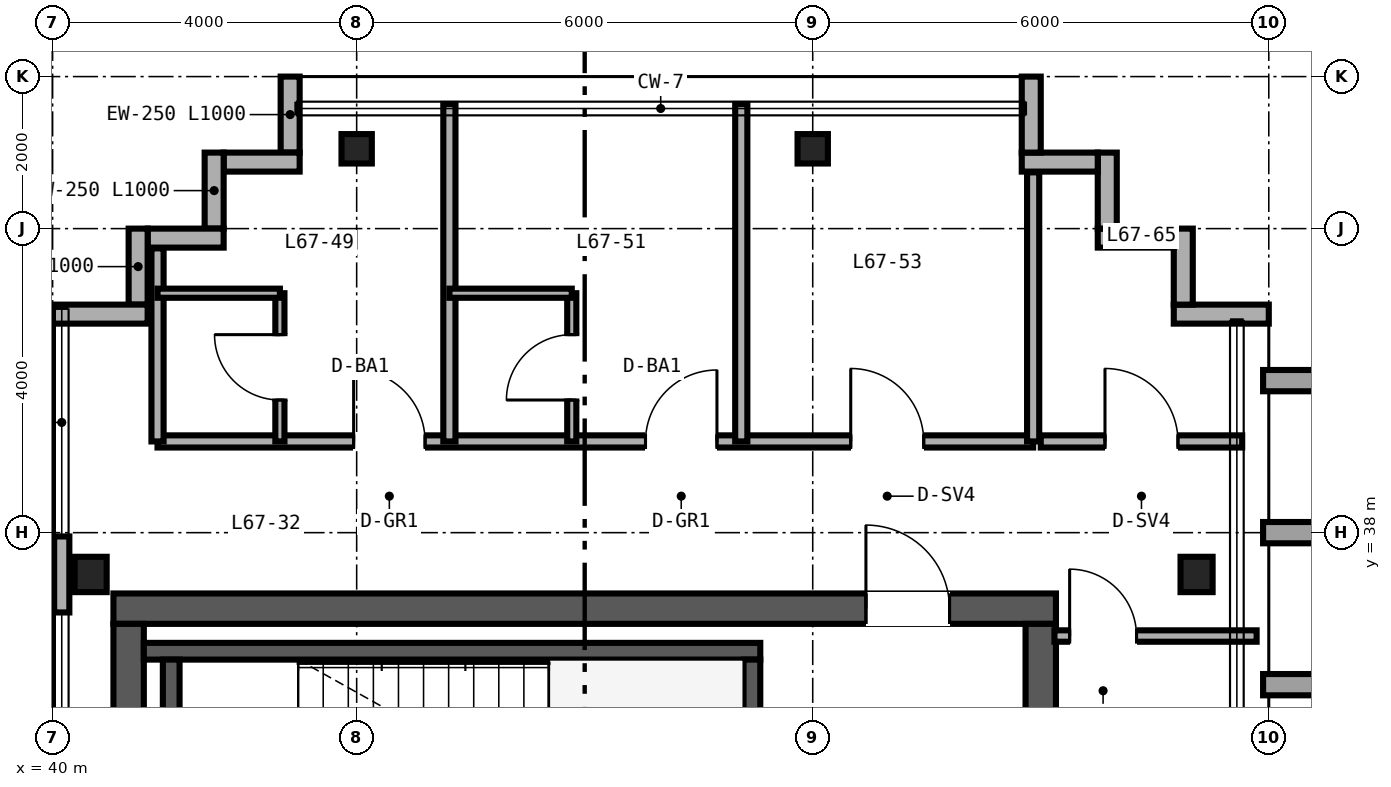
"""IFC4 building model, lengths in metres.
Left out: names, types, materials, properties, quantities, classifications, styles, units other than length and angle.
Written with IfcOpenShell. Run it as: python <this file> out.ifc"""

import sys

from ifc_helpers import new_model, si_unit, direction, frame, frame_2d, origin, origin_2d, place, context, subcontext, project, spatial, rectangle, i_section, extrude, source, transform, mapped, element, fill, save


model = new_model("IFC4")
c1 = context("Model", 3, precision=1e-05, world=origin(), true_north=direction((0.0, 1.0)))
c2 = subcontext(c1, "Body", "Model", "MODEL_VIEW")
j1 = project(units=[si_unit("LENGTHUNIT", "METRE"), si_unit("PLANEANGLEUNIT", "RADIAN")], contexts=[c1])
p1 = place(None, origin())
s1 = spatial("IfcSite", under=j1, at=p1, CompositionType="ELEMENT")
p2 = place(p1, origin())
s2 = spatial("IfcBuilding", under=s1, at=p2, CompositionType="ELEMENT")
p3 = place(p2, frame((0.0, 0.0, 265.2)))
s3 = spatial("IfcBuildingStorey", under=s2, at=p3, CompositionType="ELEMENT", Elevation=265.2)
p4 = place(p3, frame((40.8, 37.0, 0.0), z_axis=(0.0, 0.0, 1.0), x_axis=(1.0, 0.0, 0.0)))
e1 = element("IfcWall", 1, at=p4, inside=s3, PredefinedType="SHEAR", context=c2, shape_type="SweptSolid", body=[
    extrude(rectangle(XDim=12.4, YDim=0.4, at=frame_2d((6.2, 0.0))), origin(), (0.0, 0.0, 1.0), 3.38),
])
p5 = place(p4, frame((9.9, 0.0, 0.0)))
e2 = element("IfcOpeningElement", 2, at=p5, cuts=e1, PredefinedType="OPENING", context=c2, shape_type="SweptSolid", body=[
    extrude(rectangle(XDim=1.1, YDim=2.15, at=frame_2d((0.55, 1.075))), frame((0.0, 0.21, 0.0), z_axis=(0.0, -1.0, 0.0), x_axis=(1.0, 0.0, 0.0)), (0.0, 0.0, 1.0), 0.42),
])
for number, where, z_axis, x_axis in (
    (3, (41.0, 15.2, 0.0), (0.0, 0.0, 1.0), (0.0, 1.0, 0.0)),
    (4, (53.0, 15.2, 0.0), (0.0, 0.0, 1.0), (0.0, 1.0, 0.0)),
):
    element("IfcWall", number, at=place(p3, frame(where, z_axis=z_axis, x_axis=x_axis)), inside=s3, PredefinedType="SHEAR", context=c2, shape_type="SweptSolid", body=[
        extrude(rectangle(XDim=21.6, YDim=0.4, at=frame_2d((10.8, 0.0))), origin(), (0.0, 0.0, 1.0), 3.38),
    ])
p6 = place(p3, frame((41.2, 36.44, 0.0), z_axis=(0.0, 0.0, 1.0), x_axis=(1.0, 0.0, 0.0)))
e5 = element("IfcWall", 5, at=p6, inside=s3, PredefinedType="SHEAR", context=c2, shape_type="SweptSolid", body=[
    extrude(rectangle(XDim=8.11, YDim=0.22, at=frame_2d((4.055, 0.0))), origin(), (0.0, 0.0, 1.0), 3.4),
])
for number, where, z_axis, x_axis in (
    (6, (41.56, 33.05, 0.0), (0.0, 0.0, 1.0), (0.0, 1.0, 0.0)),
    (7, (49.2, 33.05, 0.0), (0.0, 0.0, 1.0), (0.0, 1.0, 0.0)),
):
    element("IfcWall", number, at=place(p3, frame(where, z_axis=z_axis, x_axis=x_axis)), inside=s3, PredefinedType="SHEAR", context=c2, shape_type="SweptSolid", body=[
        extrude(rectangle(XDim=3.28, YDim=0.22, at=frame_2d((1.64, 0.0))), origin(), (0.0, 0.0, 1.0), 3.4),
    ])
m1 = source(origin(), c2, "Body", "SweptSolid", [
    extrude(i_section(OverallWidth=0.422, OverallDepth=0.465, WebThickness=0.045, FlangeThickness=0.073, FilletRadius=0.025, at=origin_2d()), origin(), (0.0, 0.0, 1.0), 3.38),
])
for number, where, z_axis, x_axis in (
    (8, (40.5, 37.45, 0.0), (0.0, 0.0, 1.0), (1.0, 0.0, 0.0)),
    (9, (55.05, 37.45, 0.0), (0.0, 0.0, 1.0), (1.0, 0.0, 0.0)),
):
    element("IfcColumn", number, at=place(p3, frame(where, z_axis=z_axis, x_axis=x_axis)), inside=s3, PredefinedType="COLUMN", context=c2, shape_type="MappedRepresentation", body=[
        mapped(m1, transform((0.0, 0.0, 0.0), scale=1.0)),
    ])
m2 = source(origin(), c2, "Body", "SweptSolid", [
    extrude(i_section(OverallWidth=0.399, OverallDepth=0.387, WebThickness=0.021, FlangeThickness=0.033, FilletRadius=0.025, at=origin_2d()), origin(), (0.0, 0.0, 1.0), 3.38),
])
for number, where, z_axis, x_axis in (
    (10, (44.0, 43.05, 0.0), (0.0, 0.0, 1.0), (1.0, 0.0, 0.0)),
    (11, (50.0, 43.05, 0.0), (0.0, 0.0, 1.0), (1.0, 0.0, 0.0)),
):
    element("IfcColumn", number, at=place(p3, frame(where, z_axis=z_axis, x_axis=x_axis)), inside=s3, PredefinedType="COLUMN", context=c2, shape_type="MappedRepresentation", body=[
        mapped(m2, transform((0.0, 0.0, 0.0), scale=1.0)),
    ])
p7 = place(p3, frame((56.0, 40.875, 0.0), z_axis=(0.0, 0.0, 1.0), x_axis=(-1.0, 0.0, 0.0)))
e12 = element("IfcWall", 12, at=p7, inside=s3, PredefinedType="SOLIDWALL", context=c2, shape_type="SweptSolid", body=[
    extrude(rectangle(XDim=1.25, YDim=0.25, at=frame_2d((0.625, 0.0))), origin(), (0.0, 0.0, 1.0), 3.38),
])
for number, where, z_axis, x_axis in (
    (13, (54.875, 41.0, 0.0), (0.0, 0.0, 1.0), (0.0, 1.0, 0.0)),
    (14, (54.75, 41.875, 0.0), (0.0, 0.0, 1.0), (-1.0, 0.0, 0.0)),
    (15, (53.875, 42.0, 0.0), (0.0, 0.0, 1.0), (0.0, 1.0, 0.0)),
    (16, (53.75, 42.875, 0.0), (0.0, 0.0, 1.0), (-1.0, 0.0, 0.0)),
    (17, (52.875, 43.0, 0.0), (0.0, 0.0, 1.0), (0.0, 1.0, 0.0)),
    (18, (43.125, 44.0, 0.0), (0.0, 0.0, 1.0), (0.0, -1.0, 0.0)),
    (19, (43.25, 42.875, 0.0), (0.0, 0.0, 1.0), (-1.0, 0.0, 0.0)),
    (20, (42.125, 43.0, 0.0), (0.0, 0.0, 1.0), (0.0, -1.0, 0.0)),
    (21, (42.25, 41.875, 0.0), (0.0, 0.0, 1.0), (-1.0, 0.0, 0.0)),
    (22, (41.125, 42.0, 0.0), (0.0, 0.0, 1.0), (0.0, -1.0, 0.0)),
):
    element("IfcWall", number, at=place(p3, frame(where, z_axis=z_axis, x_axis=x_axis)), inside=s3, PredefinedType="SOLIDWALL", context=c2, shape_type="SweptSolid", body=[
        extrude(rectangle(XDim=1.0, YDim=0.25, at=frame_2d((0.5, 0.0))), origin(), (0.0, 0.0, 1.0), 3.38),
    ])
p8 = place(p3, frame((41.25, 40.875, 0.0), z_axis=(0.0, 0.0, 1.0), x_axis=(-1.0, 0.0, 0.0)))
e23 = element("IfcWall", 23, at=p8, inside=s3, PredefinedType="SOLIDWALL", context=c2, shape_type="SweptSolid", body=[
    extrude(rectangle(XDim=1.25, YDim=0.25, at=frame_2d((0.625, 0.0))), origin(), (0.0, 0.0, 1.0), 3.38),
])
p9 = place(p3, frame((40.12, 36.95, 0.0), z_axis=(0.0, 0.0, 1.0), x_axis=(0.0, 1.0, 0.0)))
e24 = element("IfcWall", 24, at=p9, inside=s3, PredefinedType="PARAPET", context=c2, shape_type="SweptSolid", body=[
    extrude(rectangle(XDim=1.0, YDim=0.2, at=frame_2d((0.5, 0.0))), origin(), (0.0, 0.0, 1.0), 3.38),
])
p10 = place(p3, frame((41.38, 39.2, 0.0), z_axis=(0.0, 0.0, 1.0), x_axis=(1.0, 0.0, 0.0)))
e25 = element("IfcWall", 25, at=p10, inside=s3, PredefinedType="PARTITIONING", context=c2, shape_type="SweptSolid", body=[
    extrude(rectangle(XDim=11.52, YDim=0.16, at=frame_2d((5.76, 0.0))), origin(), (0.0, 0.0, 1.0), 3.38),
])
p11 = place(p10, frame((2.58, 0.0, 0.0)))
e26 = element("IfcOpeningElement", 26, at=p11, cuts=e25, PredefinedType="OPENING", context=c2, shape_type="SweptSolid", body=[
    extrude(rectangle(XDim=0.94, YDim=2.15, at=frame_2d((0.47, 1.075))), frame((0.0, 0.09, 0.0), z_axis=(0.0, -1.0, 0.0), x_axis=(1.0, 0.0, 0.0)), (0.0, 0.0, 1.0), 0.18),
])
p12 = place(p10, frame((6.42, 0.0, 0.0)))
e27 = element("IfcOpeningElement", 27, at=p12, cuts=e25, PredefinedType="OPENING", context=c2, shape_type="SweptSolid", body=[
    extrude(rectangle(XDim=0.94, YDim=2.15, at=frame_2d((0.47, 1.075))), frame((0.0, 0.09, 0.0), z_axis=(0.0, -1.0, 0.0), x_axis=(1.0, 0.0, 0.0)), (0.0, 0.0, 1.0), 0.18),
])
p13 = place(p10, frame((9.12, 0.0, 0.0)))
e28 = element("IfcOpeningElement", 28, at=p13, cuts=e25, PredefinedType="OPENING", context=c2, shape_type="SweptSolid", body=[
    extrude(rectangle(XDim=0.96, YDim=2.15, at=frame_2d((0.48, 1.075))), frame((0.0, 0.09, 0.0), z_axis=(0.0, -1.0, 0.0), x_axis=(1.0, 0.0, 0.0)), (0.0, 0.0, 1.0), 0.18),
])
p14 = place(p3, frame((41.38, 39.2, 0.0), z_axis=(0.0, 0.0, 1.0), x_axis=(0.0, 1.0, 0.0)))
e29 = element("IfcWall", 29, at=p14, inside=s3, PredefinedType="PARTITIONING", context=c2, shape_type="SweptSolid", body=[
    extrude(rectangle(XDim=2.54, YDim=0.16, at=frame_2d((1.27, 0.0))), origin(), (0.0, 0.0, 1.0), 3.38),
])
p15 = place(p3, frame((52.9, 39.2, 0.0), z_axis=(0.0, 0.0, 1.0), x_axis=(0.0, 1.0, 0.0)))
e30 = element("IfcWall", 30, at=p15, inside=s3, PredefinedType="PARTITIONING", context=c2, shape_type="SweptSolid", body=[
    extrude(rectangle(XDim=3.54, YDim=0.16, at=frame_2d((1.77, 0.0))), origin(), (0.0, 0.0, 1.0), 3.38),
])
p16 = place(p3, frame((45.22, 39.2, 0.0), z_axis=(0.0, 0.0, 1.0), x_axis=(0.0, 1.0, 0.0)))
e31 = element("IfcWall", 31, at=p16, inside=s3, PredefinedType="PARTITIONING", context=c2, shape_type="SweptSolid", body=[
    extrude(rectangle(XDim=4.44, YDim=0.16, at=frame_2d((2.22, 0.0))), origin(), (0.0, 0.0, 1.0), 2.687),
])
p17 = place(p3, frame((42.99, 39.2, 0.0), z_axis=(0.0, 0.0, 1.0), x_axis=(0.0, 1.0, 0.0)))
e32 = element("IfcWall", 32, at=p17, inside=s3, PredefinedType="PARTITIONING", context=c2, shape_type="SweptSolid", body=[
    extrude(rectangle(XDim=1.95, YDim=0.12, at=frame_2d((0.975, 0.0))), origin(), (0.0, 0.0, 1.0), 3.38),
])
p18 = place(p17, frame((0.545, 0.0, 0.0)))
e33 = element("IfcOpeningElement", 33, at=p18, cuts=e32, PredefinedType="OPENING", context=c2, shape_type="SweptSolid", body=[
    extrude(rectangle(XDim=0.86, YDim=2.1, at=frame_2d((0.43, 1.05))), frame((0.0, 0.07, 0.0), z_axis=(0.0, -1.0, 0.0), x_axis=(1.0, 0.0, 0.0)), (0.0, 0.0, 1.0), 0.14),
])
p19 = place(p3, frame((41.38, 41.15, 0.0), z_axis=(0.0, 0.0, 1.0), x_axis=(1.0, 0.0, 0.0)))
e34 = element("IfcWall", 34, at=p19, inside=s3, PredefinedType="PARTITIONING", context=c2, shape_type="SweptSolid", body=[
    extrude(rectangle(XDim=1.61, YDim=0.12, at=frame_2d((0.805, 0.0))), origin(), (0.0, 0.0, 1.0), 3.38),
])
p20 = place(p3, frame((49.06, 39.2, 0.0), z_axis=(0.0, 0.0, 1.0), x_axis=(0.0, 1.0, 0.0)))
e35 = element("IfcWall", 35, at=p20, inside=s3, PredefinedType="PARTITIONING", context=c2, shape_type="SweptSolid", body=[
    extrude(rectangle(XDim=4.44, YDim=0.16, at=frame_2d((2.22, 0.0))), origin(), (0.0, 0.0, 1.0), 2.687),
])
p21 = place(p3, frame((46.83, 39.2, 0.0), z_axis=(0.0, 0.0, 1.0), x_axis=(0.0, 1.0, 0.0)))
e36 = element("IfcWall", 36, at=p21, inside=s3, PredefinedType="PARTITIONING", context=c2, shape_type="SweptSolid", body=[
    extrude(rectangle(XDim=1.95, YDim=0.12, at=frame_2d((0.975, 0.0))), origin(), (0.0, 0.0, 1.0), 3.38),
])
p22 = place(p21, frame((0.545, 0.0, 0.0)))
e37 = element("IfcOpeningElement", 37, at=p22, cuts=e36, PredefinedType="OPENING", context=c2, shape_type="SweptSolid", body=[
    extrude(rectangle(XDim=0.86, YDim=2.1, at=frame_2d((0.43, 1.05))), frame((0.0, 0.07, 0.0), z_axis=(0.0, -1.0, 0.0), x_axis=(1.0, 0.0, 0.0)), (0.0, 0.0, 1.0), 0.14),
])
p23 = place(p3, frame((45.22, 41.15, 0.0), z_axis=(0.0, 0.0, 1.0), x_axis=(1.0, 0.0, 0.0)))
e38 = element("IfcWall", 38, at=p23, inside=s3, PredefinedType="PARTITIONING", context=c2, shape_type="SweptSolid", body=[
    extrude(rectangle(XDim=1.61, YDim=0.12, at=frame_2d((0.805, 0.0))), origin(), (0.0, 0.0, 1.0), 3.38),
])
p24 = place(p3, frame((53.18, 36.64, 0.0), z_axis=(0.0, 0.0, 1.0), x_axis=(1.0, 0.0, 0.0)))
e39 = element("IfcWall", 39, at=p24, inside=s3, PredefinedType="PARTITIONING", context=c2, shape_type="SweptSolid", body=[
    extrude(rectangle(XDim=2.66, YDim=0.15, at=frame_2d((1.33, 0.0))), origin(), (0.0, 0.0, 1.0), 2.763),
])
p25 = place(p24, frame((0.2, 0.0, 0.0)))
e40 = element("IfcOpeningElement", 40, at=p25, cuts=e39, PredefinedType="OPENING", context=c2, shape_type="SweptSolid", body=[
    extrude(rectangle(XDim=0.88, YDim=2.15, at=frame_2d((0.44, 1.075))), frame((0.0, 0.085, 0.0), z_axis=(0.0, -1.0, 0.0), x_axis=(1.0, 0.0, 0.0)), (0.0, 0.0, 1.0), 0.17),
])
p26 = place(p3, frame((53.0, 39.2, 0.0), z_axis=(0.0, 0.0, 1.0), x_axis=(1.0, 0.0, 0.0)))
e41 = element("IfcWall", 41, at=p26, inside=s3, PredefinedType="PARTITIONING", context=c2, shape_type="SweptSolid", body=[
    extrude(rectangle(XDim=2.65, YDim=0.16, at=frame_2d((1.325, 0.0))), origin(), (0.0, 0.0, 1.0), 3.38),
])
p27 = place(p26, frame((0.845, 0.0, 0.0)))
e42 = element("IfcOpeningElement", 42, at=p27, cuts=e41, PredefinedType="OPENING", context=c2, shape_type="SweptSolid", body=[
    extrude(rectangle(XDim=0.96, YDim=2.15, at=frame_2d((0.48, 1.075))), frame((0.0, 0.09, 0.0), z_axis=(0.0, -1.0, 0.0), x_axis=(1.0, 0.0, 0.0)), (0.0, 0.0, 1.0), 0.18),
])
m3 = source(origin(), c2, "Body", "SweptSolid", [
    extrude(rectangle(XDim=1.1, YDim=2.15, at=frame_2d((0.55, 1.075))), frame((0.0, 0.025, 0.0), z_axis=(0.0, -1.0, 0.0), x_axis=(1.0, 0.0, 0.0)), (0.0, 0.0, 1.0), 0.05),
])
p28 = place(p5, origin())
e43 = element("IfcDoor", 43, at=p28, inside=s3, OperationType="SINGLE_SWING_LEFT", PredefinedType="DOOR", context=c2, shape_type="MappedRepresentation", body=[
    mapped(m3, transform((0.0, 0.0, 0.0), scale=1.0)),
])
fill(e2, e43)
m4 = source(origin(), c2, "Body", "SweptSolid", [
    extrude(rectangle(XDim=0.86, YDim=2.1, at=frame_2d((0.43, 1.05))), frame((0.0, 0.025, 0.0), z_axis=(0.0, -1.0, 0.0), x_axis=(1.0, 0.0, 0.0)), (0.0, 0.0, 1.0), 0.05),
])
p29 = place(p18, origin())
e44 = element("IfcDoor", 44, at=p29, inside=s3, OperationType="SINGLE_SWING_RIGHT", PredefinedType="DOOR", context=c2, shape_type="MappedRepresentation", body=[
    mapped(m4, transform((0.0, 0.0, 0.0), scale=1.0)),
])
fill(e33, e44)
p30 = place(p22, origin())
e45 = element("IfcDoor", 45, at=p30, inside=s3, OperationType="SINGLE_SWING_LEFT", PredefinedType="DOOR", context=c2, shape_type="MappedRepresentation", body=[
    mapped(m4, transform((0.0, 0.0, 0.0), scale=1.0)),
])
fill(e37, e45)
m5 = source(origin(), c2, "Body", "SweptSolid", [
    extrude(rectangle(XDim=0.94, YDim=2.15, at=frame_2d((0.47, 1.075))), frame((0.0, 0.025, 0.0), z_axis=(0.0, -1.0, 0.0), x_axis=(1.0, 0.0, 0.0)), (0.0, 0.0, 1.0), 0.05),
])
p31 = place(p11, origin())
e46 = element("IfcDoor", 46, at=p31, inside=s3, OperationType="SINGLE_SWING_LEFT", PredefinedType="DOOR", context=c2, shape_type="MappedRepresentation", body=[
    mapped(m5, transform((0.0, 0.0, 0.0), scale=1.0)),
])
fill(e26, e46)
p32 = place(p12, origin())
e47 = element("IfcDoor", 47, at=p32, inside=s3, OperationType="SINGLE_SWING_RIGHT", PredefinedType="DOOR", context=c2, shape_type="MappedRepresentation", body=[
    mapped(m5, transform((0.0, 0.0, 0.0), scale=1.0)),
])
fill(e27, e47)
m6 = source(origin(), c2, "Body", "SweptSolid", [
    extrude(rectangle(XDim=0.96, YDim=2.15, at=frame_2d((0.48, 1.075))), frame((0.0, 0.025, 0.0), z_axis=(0.0, -1.0, 0.0), x_axis=(1.0, 0.0, 0.0)), (0.0, 0.0, 1.0), 0.05),
])
p33 = place(p13, origin())
e48 = element("IfcDoor", 48, at=p33, inside=s3, OperationType="SINGLE_SWING_LEFT", PredefinedType="DOOR", context=c2, shape_type="MappedRepresentation", body=[
    mapped(m6, transform((0.0, 0.0, 0.0), scale=1.0)),
])
fill(e28, e48)
m7 = source(origin(), c2, "Body", "SweptSolid", [
    extrude(rectangle(XDim=0.88, YDim=2.15, at=frame_2d((0.44, 1.075))), frame((0.0, 0.025, 0.0), z_axis=(0.0, -1.0, 0.0), x_axis=(1.0, 0.0, 0.0)), (0.0, 0.0, 1.0), 0.05),
])
p34 = place(p25, origin())
e49 = element("IfcDoor", 49, at=p34, inside=s3, OperationType="SINGLE_SWING_LEFT", PredefinedType="DOOR", context=c2, shape_type="MappedRepresentation", body=[
    mapped(m7, transform((0.0, 0.0, 0.0), scale=1.0)),
])
fill(e40, e49)
p35 = place(p27, origin())
e50 = element("IfcDoor", 50, at=p35, inside=s3, OperationType="SINGLE_SWING_LEFT", PredefinedType="DOOR", context=c2, shape_type="MappedRepresentation", body=[
    mapped(m6, transform((0.0, 0.0, 0.0), scale=1.0)),
])
fill(e42, e50)
save(model, sys.argv[1])
